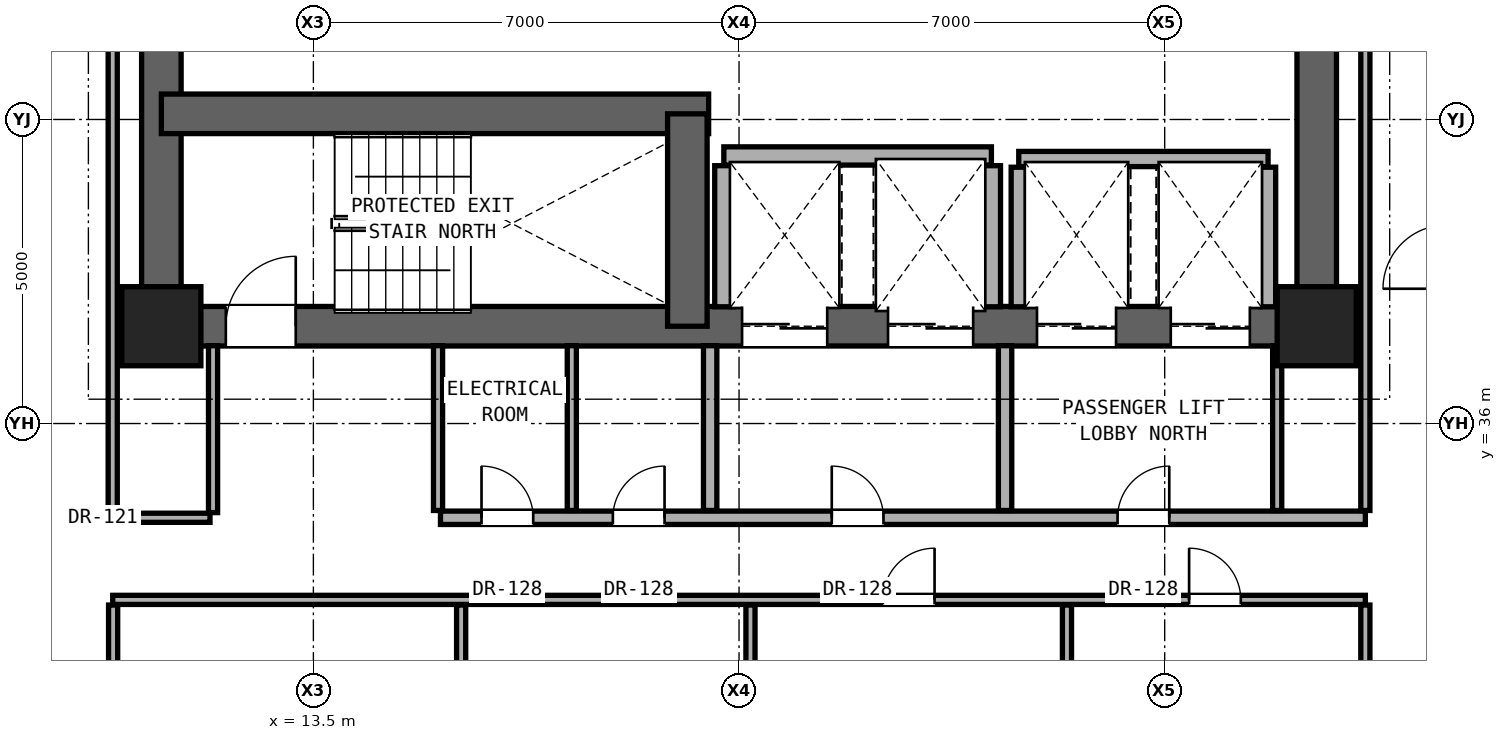
"""IFC4 building model, lengths in metres.
Left out: names, types, materials, properties, quantities, classifications, styles, units other than length and angle.
Written with IfcOpenShell. Run it as: python <this file> out.ifc"""

import sys

from ifc_helpers import new_model, si_unit, direction, frame, frame_2d, origin, origin_2d, place, context, subcontext, project, spatial, rectangle, extrude, element, fill, save


model = new_model("IFC4")
c1 = context("Model", 3, precision=1e-05, world=origin(), true_north=direction((0.0, 1.0)))
c2 = subcontext(c1, "Body", "Model", "MODEL_VIEW")
j1 = project(units=[si_unit("LENGTHUNIT", "METRE"), si_unit("PLANEANGLEUNIT", "RADIAN")], contexts=[c1])
p1 = place(None, origin())
s1 = spatial("IfcSite", under=j1, at=p1, CompositionType="ELEMENT")
p2 = place(p1, origin())
s2 = spatial("IfcBuilding", under=s1, at=p2, CompositionType="ELEMENT")
p3 = place(p2, frame((0.0, 0.0, 65.3)))
s3 = spatial("IfcBuildingStorey", under=s2, at=p3, CompositionType="ELEMENT", Elevation=65.3)
for number, where, z_axis, x_axis in (
    (1, (11.0, 37.6, 0.0), (0.0, 0.0, 1.0), (1.0, 0.0, 0.0)),
    (2, (30.0, 37.6, 0.0), (0.0, 0.0, 1.0), (1.0, 0.0, 0.0)),
):
    element("IfcColumn", number, at=place(p3, frame(where, z_axis=z_axis, x_axis=x_axis)), inside=s3, PredefinedType="COLUMN", context=c2, shape_type="SweptSolid", body=[
        extrude(rectangle(XDim=1.3, YDim=1.3, at=origin_2d()), origin(), (0.0, 0.0, 1.0), 3.3),
    ])
for number, where, z_axis, x_axis in (
    (3, (11.0, 37.6, 0.0), (0.0, 0.0, 1.0), (0.0, 1.0, 0.0)),
    (4, (30.0, 37.6, 0.0), (0.0, 0.0, 1.0), (0.0, 1.0, 0.0)),
):
    element("IfcWall", number, at=place(p3, frame(where, z_axis=z_axis, x_axis=x_axis)), inside=s3, PredefinedType="SHEAR", context=c2, shape_type="SweptSolid", body=[
        extrude(rectangle(XDim=6.0, YDim=0.65, at=frame_2d((3.0, 0.0))), origin(), (0.0, 0.0, 1.0), 3.06),
    ])
p4 = place(p3, frame((11.0, 37.6, 0.0), z_axis=(0.0, 0.0, 1.0), x_axis=(1.0, 0.0, 0.0)))
e5 = element("IfcWall", 5, at=p4, inside=s3, PredefinedType="SHEAR", context=c2, shape_type="SweptSolid", body=[
    extrude(rectangle(XDim=19.0, YDim=0.65, at=frame_2d((9.5, 0.0))), origin(), (0.0, 0.0, 1.0), 3.06),
])
p5 = place(p4, frame((1.06, 0.0, 0.0)))
e6 = element("IfcOpeningElement", 6, at=p5, cuts=e5, PredefinedType="OPENING", context=c2, shape_type="SweptSolid", body=[
    extrude(rectangle(XDim=1.15, YDim=2.2, at=frame_2d((0.575, 1.1))), frame((0.0, 0.335, 0.0), z_axis=(0.0, -1.0, 0.0), x_axis=(1.0, 0.0, 0.0)), (0.0, 0.0, 1.0), 0.67),
])
p6 = place(p4, frame((9.55, 0.0, 0.0)))
e7 = element("IfcOpeningElement", 7, at=p6, cuts=e5, PredefinedType="OPENING", context=c2, shape_type="SweptSolid", body=[
    extrude(rectangle(XDim=1.4, YDim=2.35, at=frame_2d((0.7, 1.175))), frame((0.0, 0.335, 0.0), z_axis=(0.0, -1.0, 0.0), x_axis=(1.0, 0.0, 0.0)), (0.0, 0.0, 1.0), 0.67),
])
p7 = place(p4, frame((11.95, 0.0, 0.0)))
e8 = element("IfcOpeningElement", 8, at=p7, cuts=e5, PredefinedType="OPENING", context=c2, shape_type="SweptSolid", body=[
    extrude(rectangle(XDim=1.4, YDim=2.35, at=frame_2d((0.7, 1.175))), frame((0.0, 0.335, 0.0), z_axis=(0.0, -1.0, 0.0), x_axis=(1.0, 0.0, 0.0)), (0.0, 0.0, 1.0), 0.67),
])
p8 = place(p4, frame((14.4, 0.0, 0.0)))
e9 = element("IfcOpeningElement", 9, at=p8, cuts=e5, PredefinedType="OPENING", context=c2, shape_type="SweptSolid", body=[
    extrude(rectangle(XDim=1.3, YDim=2.3, at=frame_2d((0.65, 1.15))), frame((0.0, 0.335, 0.0), z_axis=(0.0, -1.0, 0.0), x_axis=(1.0, 0.0, 0.0)), (0.0, 0.0, 1.0), 0.67),
])
p9 = place(p4, frame((16.6, 0.0, 0.0)))
e10 = element("IfcOpeningElement", 10, at=p9, cuts=e5, PredefinedType="OPENING", context=c2, shape_type="SweptSolid", body=[
    extrude(rectangle(XDim=1.3, YDim=2.3, at=frame_2d((0.65, 1.15))), frame((0.0, 0.335, 0.0), z_axis=(0.0, -1.0, 0.0), x_axis=(1.0, 0.0, 0.0)), (0.0, 0.0, 1.0), 0.67),
])
p10 = place(p3, frame((11.0, 41.093, 0.0), z_axis=(0.0, 0.0, 1.0), x_axis=(1.0, 0.0, 0.0)))
e11 = element("IfcWall", 11, at=p10, inside=s3, PredefinedType="SHEAR", context=c2, shape_type="SweptSolid", body=[
    extrude(rectangle(XDim=9.0, YDim=0.65, at=frame_2d((4.5, 0.0))), origin(), (0.0, 0.0, 1.0), 3.06),
])
p11 = place(p3, frame((19.65, 37.6, 0.0), z_axis=(0.0, 0.0, 1.0), x_axis=(0.0, 1.0, 0.0)))
e12 = element("IfcWall", 12, at=p11, inside=s3, PredefinedType="SHEAR", context=c2, shape_type="SweptSolid", body=[
    extrude(rectangle(XDim=3.493, YDim=0.65, at=frame_2d((1.747, 0.0))), origin(), (0.0, 0.0, 1.0), 3.06),
])
p12 = place(p3, frame((10.2, 33.1, 0.0), z_axis=(0.0, 0.0, 1.0), x_axis=(1.0, 0.0, 0.0)))
e13 = element("IfcWall", 13, at=p12, inside=s3, PredefinedType="PARTITIONING", context=c2, shape_type="SweptSolid", body=[
    extrude(rectangle(XDim=20.6, YDim=0.15, at=frame_2d((10.3, 0.0))), origin(), (0.0, 0.0, 1.0), 2.104),
])
p13 = place(p12, frame((12.666, 0.0, 0.0)))
e14 = element("IfcOpeningElement", 14, at=p13, cuts=e13, PredefinedType="OPENING", context=c2, shape_type="SweptSolid", body=[
    extrude(rectangle(XDim=0.85, YDim=2.01, at=frame_2d((0.425, 1.005))), frame((0.0, 0.085, 0.0), z_axis=(0.0, -1.0, 0.0), x_axis=(1.0, 0.0, 0.0)), (0.0, 0.0, 1.0), 0.17),
])
p14 = place(p12, frame((17.701, 0.0, 0.0)))
e15 = element("IfcOpeningElement", 15, at=p14, cuts=e13, PredefinedType="OPENING", context=c2, shape_type="SweptSolid", body=[
    extrude(rectangle(XDim=0.85, YDim=2.01, at=frame_2d((0.425, 1.005))), frame((0.0, 0.085, 0.0), z_axis=(0.0, -1.0, 0.0), x_axis=(1.0, 0.0, 0.0)), (0.0, 0.0, 1.0), 0.17),
])
p15 = place(p3, frame((10.2, 34.45, 0.0), z_axis=(0.0, 0.0, 1.0), x_axis=(1.0, 0.0, 0.0)))
e16 = element("IfcWall", 16, at=p15, inside=s3, PredefinedType="PARTITIONING", context=c2, shape_type="SweptSolid", body=[
    extrude(rectangle(XDim=1.6, YDim=0.15, at=frame_2d((0.8, 0.0))), origin(), (0.0, 0.0, 1.0), 2.104),
])
p16 = place(p3, frame((15.59, 34.45, 0.0), z_axis=(0.0, 0.0, 1.0), x_axis=(1.0, 0.0, 0.0)))
e17 = element("IfcWall", 17, at=p16, inside=s3, PredefinedType="SOLIDWALL", context=c2, shape_type="SweptSolid", body=[
    extrude(rectangle(XDim=15.21, YDim=0.22, at=frame_2d((7.605, 0.0))), origin(), (0.0, 0.0, 1.0), 2.104),
])
p17 = place(p16, frame((6.435, 0.0, 0.0)))
e18 = element("IfcOpeningElement", 18, at=p17, cuts=e17, PredefinedType="OPENING", context=c2, shape_type="SweptSolid", body=[
    extrude(rectangle(XDim=0.85, YDim=2.01, at=frame_2d((0.425, 1.005))), frame((0.0, 0.12, 0.0), z_axis=(0.0, -1.0, 0.0), x_axis=(1.0, 0.0, 0.0)), (0.0, 0.0, 1.0), 0.24),
])
p18 = place(p16, frame((11.135, 0.0, 0.0)))
e19 = element("IfcOpeningElement", 19, at=p18, cuts=e17, PredefinedType="OPENING", context=c2, shape_type="SweptSolid", body=[
    extrude(rectangle(XDim=0.85, YDim=2.01, at=frame_2d((0.425, 1.005))), frame((0.0, 0.12, 0.0), z_axis=(0.0, -1.0, 0.0), x_axis=(1.0, 0.0, 0.0)), (0.0, 0.0, 1.0), 0.24),
])
p19 = place(p16, frame((0.675, 0.0, 0.0)))
e20 = element("IfcOpeningElement", 20, at=p19, cuts=e17, PredefinedType="OPENING", context=c2, shape_type="SweptSolid", body=[
    extrude(rectangle(XDim=0.85, YDim=2.01, at=frame_2d((0.425, 1.005))), frame((0.0, 0.12, 0.0), z_axis=(0.0, -1.0, 0.0), x_axis=(1.0, 0.0, 0.0)), (0.0, 0.0, 1.0), 0.24),
])
p20 = place(p16, frame((2.835, 0.0, 0.0)))
e21 = element("IfcOpeningElement", 21, at=p20, cuts=e17, PredefinedType="OPENING", context=c2, shape_type="SweptSolid", body=[
    extrude(rectangle(XDim=0.85, YDim=2.01, at=frame_2d((0.425, 1.005))), frame((0.0, 0.12, 0.0), z_axis=(0.0, -1.0, 0.0), x_axis=(1.0, 0.0, 0.0)), (0.0, 0.0, 1.0), 0.24),
])
p21 = place(p3, frame((25.1, 40.35, 0.0), z_axis=(0.0, 0.0, 1.0), x_axis=(1.0, 0.0, 0.0)))
e22 = element("IfcWall", 22, at=p21, inside=s3, PredefinedType="SOLIDWALL", context=c2, shape_type="SweptSolid", body=[
    extrude(rectangle(XDim=4.1, YDim=0.25, at=frame_2d((2.05, 0.0))), origin(), (0.0, 0.0, 1.0), 3.06),
])
p22 = place(p3, frame((20.25, 40.4, 0.0), z_axis=(0.0, 0.0, 1.0), x_axis=(1.0, 0.0, 0.0)))
e23 = element("IfcWall", 23, at=p22, inside=s3, PredefinedType="SOLIDWALL", context=c2, shape_type="SweptSolid", body=[
    extrude(rectangle(XDim=4.4, YDim=0.3, at=frame_2d((2.2, 0.0))), origin(), (0.0, 0.0, 1.0), 3.06),
])
p23 = place(p3, frame((10.207, 22.935, 0.0), z_axis=(0.0, 0.0, 1.0), x_axis=(0.0, 1.0, 0.0)))
e24 = element("IfcWall", 24, at=p23, inside=s3, PredefinedType="PARTITIONING", context=c2, shape_type="SweptSolid", body=[
    extrude(rectangle(XDim=10.08, YDim=0.15, at=frame_2d((5.04, 0.0))), origin(), (0.0, 0.0, 1.0), 2.279),
])
p24 = place(p23, frame((4.565, 0.0, 0.0)))
e25 = element("IfcOpeningElement", 25, at=p24, cuts=e24, PredefinedType="OPENING", context=c2, shape_type="SweptSolid", body=[
    extrude(rectangle(XDim=0.95, YDim=2.15, at=frame_2d((0.475, 1.075))), frame((0.0, 0.085, 0.0), z_axis=(0.0, -1.0, 0.0), x_axis=(1.0, 0.0, 0.0)), (0.0, 0.0, 1.0), 0.17),
])
p25 = place(p3, frame((10.2, 34.535, 0.0), z_axis=(0.0, 0.0, 1.0), x_axis=(0.0, 1.0, 0.0)))
e26 = element("IfcWall", 26, at=p25, inside=s3, PredefinedType="PARTITIONING", context=c2, shape_type="SweptSolid", body=[
    extrude(rectangle(XDim=9.13, YDim=0.15, at=frame_2d((4.565, 0.0))), origin(), (0.0, 0.0, 1.0), 2.436),
])
p26 = place(p3, frame((11.85, 34.535, 0.0), z_axis=(0.0, 0.0, 1.0), x_axis=(0.0, 1.0, 0.0)))
e27 = element("IfcWall", 27, at=p26, inside=s3, PredefinedType="PARTITIONING", context=c2, shape_type="SweptSolid", body=[
    extrude(rectangle(XDim=2.745, YDim=0.15, at=frame_2d((1.373, 0.0))), origin(), (0.0, 0.0, 1.0), 3.06),
])
p27 = place(p3, frame((15.55, 34.57, 0.0), z_axis=(0.0, 0.0, 1.0), x_axis=(0.0, 1.0, 0.0)))
e28 = element("IfcWall", 28, at=p27, inside=s3, PredefinedType="PARTITIONING", context=c2, shape_type="SweptSolid", body=[
    extrude(rectangle(XDim=2.71, YDim=0.15, at=frame_2d((1.355, 0.0))), origin(), (0.0, 0.0, 1.0), 2.589),
])
p28 = place(p3, frame((15.93, 22.935, 0.0), z_axis=(0.0, 0.0, 1.0), x_axis=(0.0, 1.0, 0.0)))
e29 = element("IfcWall", 29, at=p28, inside=s3, PredefinedType="PARTITIONING", context=c2, shape_type="SweptSolid", body=[
    extrude(rectangle(XDim=10.08, YDim=0.15, at=frame_2d((5.04, 0.0))), origin(), (0.0, 0.0, 1.0), 2.104),
])
p29 = place(p3, frame((17.75, 34.57, 0.0), z_axis=(0.0, 0.0, 1.0), x_axis=(0.0, 1.0, 0.0)))
e30 = element("IfcWall", 30, at=p29, inside=s3, PredefinedType="PARTITIONING", context=c2, shape_type="SweptSolid", body=[
    extrude(rectangle(XDim=2.71, YDim=0.15, at=frame_2d((1.355, 0.0))), origin(), (0.0, 0.0, 1.0), 3.06),
])
p30 = place(p3, frame((20.025, 34.57, 0.0), z_axis=(0.0, 0.0, 1.0), x_axis=(0.0, 1.0, 0.0)))
e31 = element("IfcWall", 31, at=p30, inside=s3, PredefinedType="SOLIDWALL", context=c2, shape_type="SweptSolid", body=[
    extrude(rectangle(XDim=2.71, YDim=0.22, at=frame_2d((1.355, 0.0))), origin(), (0.0, 0.0, 1.0), 3.06),
])
p31 = place(p3, frame((20.25, 37.92, 0.0), z_axis=(0.0, 0.0, 1.0), x_axis=(0.0, 1.0, 0.0)))
e32 = element("IfcWall", 32, at=p31, inside=s3, PredefinedType="SOLIDWALL", context=c2, shape_type="SweptSolid", body=[
    extrude(rectangle(XDim=2.32, YDim=0.3, at=frame_2d((1.16, 0.0))), origin(), (0.0, 0.0, 1.0), 3.06),
])
p32 = place(p3, frame((20.688, 19.985, 0.0), z_axis=(0.0, 0.0, 1.0), x_axis=(0.0, 1.0, 0.0)))
e33 = element("IfcWall", 33, at=p32, inside=s3, PredefinedType="PARTITIONING", context=c2, shape_type="SweptSolid", body=[
    extrude(rectangle(XDim=13.03, YDim=0.15, at=frame_2d((6.515, 0.0))), origin(), (0.0, 0.0, 1.0), 2.104),
])
p33 = place(p3, frame((24.65, 37.92, 0.0), z_axis=(0.0, 0.0, 1.0), x_axis=(0.0, 1.0, 0.0)))
e34 = element("IfcWall", 34, at=p33, inside=s3, PredefinedType="SOLIDWALL", context=c2, shape_type="SweptSolid", body=[
    extrude(rectangle(XDim=2.32, YDim=0.3, at=frame_2d((1.16, 0.0))), origin(), (0.0, 0.0, 1.0), 3.06),
])
p34 = place(p3, frame((24.875, 34.57, 0.0), z_axis=(0.0, 0.0, 1.0), x_axis=(0.0, 1.0, 0.0)))
e35 = element("IfcWall", 35, at=p34, inside=s3, PredefinedType="SOLIDWALL", context=c2, shape_type="SweptSolid", body=[
    extrude(rectangle(XDim=2.71, YDim=0.22, at=frame_2d((1.355, 0.0))), origin(), (0.0, 0.0, 1.0), 3.06),
])
p35 = place(p3, frame((25.1, 37.92, 0.0), z_axis=(0.0, 0.0, 1.0), x_axis=(0.0, 1.0, 0.0)))
e36 = element("IfcWall", 36, at=p35, inside=s3, PredefinedType="SOLIDWALL", context=c2, shape_type="SweptSolid", body=[
    extrude(rectangle(XDim=2.295, YDim=0.25, at=frame_2d((1.147, 0.0))), origin(), (0.0, 0.0, 1.0), 3.06),
])
p36 = place(p3, frame((25.893, 19.985, 0.0), z_axis=(0.0, 0.0, 1.0), x_axis=(0.0, 1.0, 0.0)))
e37 = element("IfcWall", 37, at=p36, inside=s3, PredefinedType="PARTITIONING", context=c2, shape_type="SweptSolid", body=[
    extrude(rectangle(XDim=13.03, YDim=0.15, at=frame_2d((6.515, 0.0))), origin(), (0.0, 0.0, 1.0), 2.104),
])
p37 = place(p3, frame((29.35, 34.57, 0.0), z_axis=(0.0, 0.0, 1.0), x_axis=(0.0, 1.0, 0.0)))
e38 = element("IfcWall", 38, at=p37, inside=s3, PredefinedType="PARTITIONING", context=c2, shape_type="SweptSolid", body=[
    extrude(rectangle(XDim=2.71, YDim=0.15, at=frame_2d((1.355, 0.0))), origin(), (0.0, 0.0, 1.0), 3.06),
])
p38 = place(p3, frame((29.2, 37.92, 0.0), z_axis=(0.0, 0.0, 1.0), x_axis=(0.0, 1.0, 0.0)))
e39 = element("IfcWall", 39, at=p38, inside=s3, PredefinedType="SOLIDWALL", context=c2, shape_type="SweptSolid", body=[
    extrude(rectangle(XDim=2.295, YDim=0.25, at=frame_2d((1.147, 0.0))), origin(), (0.0, 0.0, 1.0), 3.06),
])
p39 = place(p3, frame((30.8, 19.985, 0.0), z_axis=(0.0, 0.0, 1.0), x_axis=(0.0, 1.0, 0.0)))
e40 = element("IfcWall", 40, at=p39, inside=s3, PredefinedType="PARTITIONING", context=c2, shape_type="SweptSolid", body=[
    extrude(rectangle(XDim=13.03, YDim=0.15, at=frame_2d((6.515, 0.0))), origin(), (0.0, 0.0, 1.0), 2.279),
])
p40 = place(p3, frame((30.8, 34.57, 0.0), z_axis=(0.0, 0.0, 1.0), x_axis=(0.0, 1.0, 0.0)))
e41 = element("IfcWall", 41, at=p40, inside=s3, PredefinedType="PARTITIONING", context=c2, shape_type="SweptSolid", body=[
    extrude(rectangle(XDim=9.095, YDim=0.15, at=frame_2d((4.547, 0.0))), origin(), (0.0, 0.0, 1.0), 2.436),
])
p41 = place(p5, origin())
e42 = element("IfcDoor", 42, at=p41, inside=s3, OperationType="SINGLE_SWING_RIGHT", PredefinedType="DOOR", context=c2, shape_type="SweptSolid", body=[
    extrude(rectangle(XDim=1.15, YDim=2.2, at=frame_2d((0.575, 1.1))), frame((0.0, 0.025, 0.0), z_axis=(0.0, -1.0, 0.0), x_axis=(1.0, 0.0, 0.0)), (0.0, 0.0, 1.0), 0.05),
])
fill(e6, e42)
p42 = place(p17, origin())
e43 = element("IfcDoor", 43, at=p42, inside=s3, OperationType="SINGLE_SWING_LEFT", PredefinedType="DOOR", context=c2, shape_type="SweptSolid", body=[
    extrude(rectangle(XDim=0.85, YDim=2.01, at=frame_2d((0.425, 1.005))), frame((0.0, 0.025, 0.0), z_axis=(0.0, -1.0, 0.0), x_axis=(1.0, 0.0, 0.0)), (0.0, 0.0, 1.0), 0.05),
])
fill(e18, e43)
p43 = place(p18, origin())
e44 = element("IfcDoor", 44, at=p43, inside=s3, OperationType="SINGLE_SWING_RIGHT", PredefinedType="DOOR", context=c2, shape_type="SweptSolid", body=[
    extrude(rectangle(XDim=0.85, YDim=2.01, at=frame_2d((0.425, 1.005))), frame((0.0, 0.025, 0.0), z_axis=(0.0, -1.0, 0.0), x_axis=(1.0, 0.0, 0.0)), (0.0, 0.0, 1.0), 0.05),
])
fill(e19, e44)
p44 = place(p19, origin())
e45 = element("IfcDoor", 45, at=p44, inside=s3, OperationType="SINGLE_SWING_LEFT", PredefinedType="DOOR", context=c2, shape_type="SweptSolid", body=[
    extrude(rectangle(XDim=0.85, YDim=2.01, at=frame_2d((0.425, 1.005))), frame((0.0, 0.025, 0.0), z_axis=(0.0, -1.0, 0.0), x_axis=(1.0, 0.0, 0.0)), (0.0, 0.0, 1.0), 0.05),
])
fill(e20, e45)
p45 = place(p20, origin())
e46 = element("IfcDoor", 46, at=p45, inside=s3, OperationType="SINGLE_SWING_RIGHT", PredefinedType="DOOR", context=c2, shape_type="SweptSolid", body=[
    extrude(rectangle(XDim=0.85, YDim=2.01, at=frame_2d((0.425, 1.005))), frame((0.0, 0.025, 0.0), z_axis=(0.0, -1.0, 0.0), x_axis=(1.0, 0.0, 0.0)), (0.0, 0.0, 1.0), 0.05),
])
fill(e21, e46)
p46 = place(p13, origin())
e47 = element("IfcDoor", 47, at=p46, inside=s3, OperationType="SINGLE_SWING_RIGHT", PredefinedType="DOOR", context=c2, shape_type="SweptSolid", body=[
    extrude(rectangle(XDim=0.85, YDim=2.01, at=frame_2d((0.425, 1.005))), frame((0.0, 0.025, 0.0), z_axis=(0.0, -1.0, 0.0), x_axis=(1.0, 0.0, 0.0)), (0.0, 0.0, 1.0), 0.05),
])
fill(e14, e47)
p47 = place(p14, origin())
e48 = element("IfcDoor", 48, at=p47, inside=s3, OperationType="SINGLE_SWING_LEFT", PredefinedType="DOOR", context=c2, shape_type="SweptSolid", body=[
    extrude(rectangle(XDim=0.85, YDim=2.01, at=frame_2d((0.425, 1.005))), frame((0.0, 0.025, 0.0), z_axis=(0.0, -1.0, 0.0), x_axis=(1.0, 0.0, 0.0)), (0.0, 0.0, 1.0), 0.05),
])
fill(e15, e48)
p48 = place(p6, origin())
e49 = element("IfcDoor", 49, at=p48, inside=s3, OperationType="DOUBLE_DOOR_SLIDING", PredefinedType="DOOR", context=c2, shape_type="SweptSolid", body=[
    extrude(rectangle(XDim=1.4, YDim=2.35, at=frame_2d((0.7, 1.175))), frame((0.0, 0.025, 0.0), z_axis=(0.0, -1.0, 0.0), x_axis=(1.0, 0.0, 0.0)), (0.0, 0.0, 1.0), 0.05),
])
fill(e7, e49)
p49 = place(p7, origin())
e50 = element("IfcDoor", 50, at=p49, inside=s3, OperationType="DOUBLE_DOOR_SLIDING", PredefinedType="DOOR", context=c2, shape_type="SweptSolid", body=[
    extrude(rectangle(XDim=1.4, YDim=2.35, at=frame_2d((0.7, 1.175))), frame((0.0, 0.025, 0.0), z_axis=(0.0, -1.0, 0.0), x_axis=(1.0, 0.0, 0.0)), (0.0, 0.0, 1.0), 0.05),
])
fill(e8, e50)
p50 = place(p8, origin())
e51 = element("IfcDoor", 51, at=p50, inside=s3, OperationType="DOUBLE_DOOR_SLIDING", PredefinedType="DOOR", context=c2, shape_type="SweptSolid", body=[
    extrude(rectangle(XDim=1.3, YDim=2.3, at=frame_2d((0.65, 1.15))), frame((0.0, 0.025, 0.0), z_axis=(0.0, -1.0, 0.0), x_axis=(1.0, 0.0, 0.0)), (0.0, 0.0, 1.0), 0.05),
])
fill(e9, e51)
p51 = place(p9, origin())
e52 = element("IfcDoor", 52, at=p51, inside=s3, OperationType="DOUBLE_DOOR_SLIDING", PredefinedType="DOOR", context=c2, shape_type="SweptSolid", body=[
    extrude(rectangle(XDim=1.3, YDim=2.3, at=frame_2d((0.65, 1.15))), frame((0.0, 0.025, 0.0), z_axis=(0.0, -1.0, 0.0), x_axis=(1.0, 0.0, 0.0)), (0.0, 0.0, 1.0), 0.05),
])
fill(e10, e52)
save(model, sys.argv[1])
